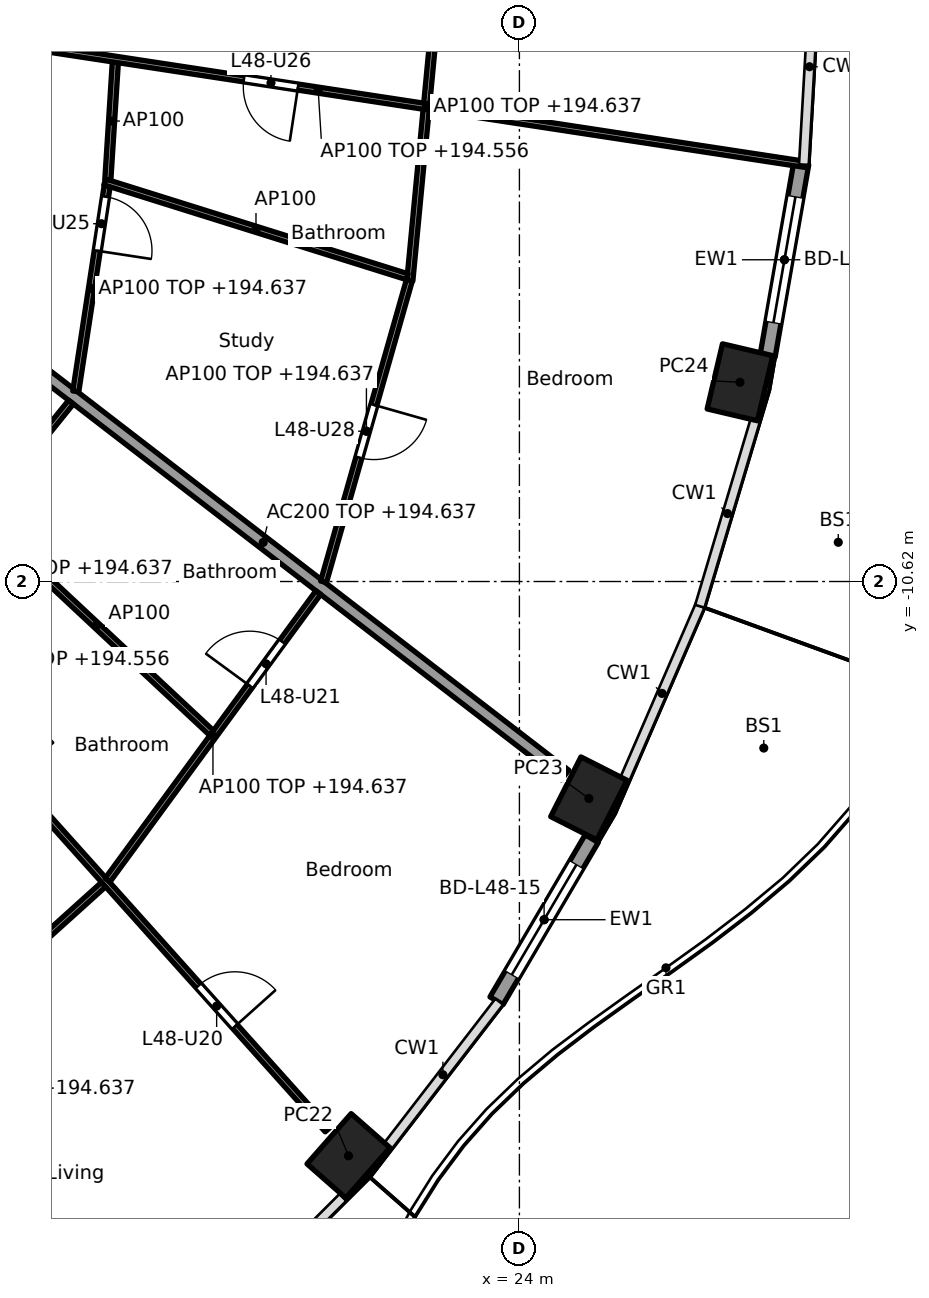
"""IFC4 building model, lengths in metres.
Left out: names, types, materials, properties, quantities, classifications, styles, units other than length and angle.
Written with IfcOpenShell. Run it as: python <this file> out.ifc"""

import sys

from ifc_helpers import new_model, si_unit, direction, frame, frame_2d, origin, origin_2d, place, context, subcontext, project, spatial, rectangle, hollow_rectangle, extrude, element, fill, save


model = new_model("IFC4")
c1 = context("Model", 3, precision=1e-05, world=origin(), true_north=direction((0.0, 1.0)))
c2 = subcontext(c1, "Body", "Model", "MODEL_VIEW")
j1 = project(units=[si_unit("LENGTHUNIT", "METRE"), si_unit("PLANEANGLEUNIT", "RADIAN")], contexts=[c1])
p1 = place(None, origin())
s1 = spatial("IfcSite", under=j1, at=p1, CompositionType="ELEMENT")
p2 = place(p1, origin())
s2 = spatial("IfcBuilding", under=s1, at=p2, CompositionType="ELEMENT")
p3 = place(p2, frame((0.0, 0.0, 191.8)))
s3 = spatial("IfcBuildingStorey", under=s2, at=p3, CompositionType="ELEMENT", Elevation=191.8)
for number, where, z_axis, x_axis in (
    (1, (21.189, -20.064, 0.0), (0.0, 0.0, 1.0), (0.66, 0.751, 0.0)),
    (2, (25.142, -14.188, 0.0), (0.0, 0.0, 1.0), (0.452, 0.892, 0.0)),
    (3, (27.627, -7.344, 0.0), (0.0, 0.0, 1.0), (0.229, 0.973, 0.0)),
):
    element("IfcColumn", number, at=place(p3, frame(where, z_axis=z_axis, x_axis=x_axis)), inside=s3, PredefinedType="COLUMN", context=c2, shape_type="SweptSolid", body=[
        extrude(hollow_rectangle(XDim=1.1, YDim=0.85, WallThickness=0.036, at=origin_2d()), origin(), (0.0, 0.0, 1.0), 3.7),
    ])
p4 = place(p3, frame((25.189, -14.848, 0.0), z_axis=(0.0, 0.0, 1.0), x_axis=(-0.506367803691, -0.862317602386, 0.0)))
e4 = element("IfcWall", 4, at=p4, inside=s3, PredefinedType="SOLIDWALL", context=c2, shape_type="SweptSolid", body=[
    extrude(rectangle(XDim=3.092, YDim=0.25, at=frame_2d((1.546, 0.0))), origin(), (0.0, 0.0, 1.0), 3.44),
])
p5 = place(p4, frame((0.496, 0.0, 0.0)))
e5 = element("IfcOpeningElement", 5, at=p5, cuts=e4, PredefinedType="OPENING", context=c2, shape_type="SweptSolid", body=[
    extrude(rectangle(XDim=2.1, YDim=2.4, at=frame_2d((1.05, 1.2))), frame((0.0, 0.135, 0.0), z_axis=(0.0, -1.0, 0.0), x_axis=(1.0, 0.0, 0.0)), (0.0, 0.0, 1.0), 0.27),
])
p6 = place(p3, frame((28.635, -3.747, 0.0), z_axis=(0.0, 0.0, 1.0), x_axis=(-0.172149769468, -0.985070787747, 0.0)))
e6 = element("IfcWall", 6, at=p6, inside=s3, PredefinedType="SOLIDWALL", context=c2, shape_type="SweptSolid", body=[
    extrude(rectangle(XDim=3.211, YDim=0.25, at=frame_2d((1.605, 0.0))), origin(), (0.0, 0.0, 1.0), 3.44),
])
p7 = place(p6, frame((0.555, 0.0, 0.0)))
e7 = element("IfcOpeningElement", 7, at=p7, cuts=e6, PredefinedType="OPENING", context=c2, shape_type="SweptSolid", body=[
    extrude(rectangle(XDim=2.1, YDim=2.4, at=frame_2d((1.05, 1.2))), frame((0.0, 0.135, 0.0), z_axis=(0.0, -1.0, 0.0), x_axis=(1.0, 0.0, 0.0)), (0.0, 0.0, 1.0), 0.27),
])
p8 = place(p3, frame((14.822, -6.154, 0.0), z_axis=(0.0, 0.0, 1.0), x_axis=(0.792203056092, -0.610257583254, 0.0)))
e8 = element("IfcWall", 8, at=p8, inside=s3, PredefinedType="PARTITIONING", context=c2, shape_type="SweptSolid", body=[
    extrude(rectangle(XDim=12.533, YDim=0.2, at=frame_2d((6.266, 0.0))), origin(), (0.0, 0.0, 1.0), 2.837),
])
p9 = place(p3, frame((22.744, 0.05, 0.0), z_axis=(0.0, 0.0, 1.0), x_axis=(-0.094931362305, -0.995483820286, 0.0)))
e9 = element("IfcWall", 9, at=p9, inside=s3, PredefinedType="PARTITIONING", context=c2, shape_type="SweptSolid", body=[
    extrude(rectangle(XDim=5.748, YDim=0.1, at=frame_2d((2.874, 0.0))), origin(), (0.0, 0.0, 1.0), 2.837),
])
p10 = place(p9, frame((1.012, 0.0, 0.0)))
e10 = element("IfcOpeningElement", 10, at=p10, cuts=e9, PredefinedType="OPENING", context=c2, shape_type="SweptSolid", body=[
    extrude(rectangle(XDim=0.9, YDim=2.1, at=frame_2d((0.45, 1.05))), frame((0.0, 0.06, 0.0), z_axis=(0.0, -1.0, 0.0), x_axis=(1.0, 0.0, 0.0)), (0.0, 0.0, 1.0), 0.12),
])
p11 = place(p3, frame((13.045, -19.313, 0.0), z_axis=(0.0, 0.0, 1.0), x_axis=(0.742790086539, 0.66952437397, 0.0)))
e11 = element("IfcWall", 11, at=p11, inside=s3, PredefinedType="PARTITIONING", context=c2, shape_type="SweptSolid", body=[
    extrude(rectangle(XDim=5.542, YDim=0.1, at=frame_2d((2.771, 0.0))), origin(), (0.0, 0.0, 1.0), 2.837),
])
p12 = place(p11, frame((2.321, 0.0, 0.0)))
e12 = element("IfcOpeningElement", 12, at=p12, cuts=e11, PredefinedType="OPENING", context=c2, shape_type="SweptSolid", body=[
    extrude(rectangle(XDim=0.9, YDim=2.1, at=frame_2d((0.45, 1.05))), frame((0.0, 0.06, 0.0), z_axis=(0.0, -1.0, 0.0), x_axis=(1.0, 0.0, 0.0)), (0.0, 0.0, 1.0), 0.12),
])
p13 = place(p3, frame((10.178, -7.732, 0.0), z_axis=(0.0, 0.0, 1.0), x_axis=(0.667283629999, -0.74480370376, 0.0)))
e13 = element("IfcWall", 13, at=p13, inside=s3, PredefinedType="PARTITIONING", context=c2, shape_type="SweptSolid", body=[
    extrude(rectangle(XDim=15.983, YDim=0.1, at=frame_2d((7.992, 0.0))), origin(), (0.0, 0.0, 1.0), 2.756),
])
p14 = place(p13, frame((2.07, 0.0, 0.0)))
e14 = element("IfcOpeningElement", 14, at=p14, cuts=e13, PredefinedType="OPENING", context=c2, shape_type="SweptSolid", body=[
    extrude(rectangle(XDim=0.9, YDim=2.1, at=frame_2d((0.45, 1.05))), frame((0.0, 0.06, 0.0), z_axis=(0.0, -1.0, 0.0), x_axis=(1.0, 0.0, 0.0)), (0.0, 0.0, 1.0), 0.12),
])
p15 = place(p13, frame((7.331, 0.0, 0.0)))
e15 = element("IfcOpeningElement", 15, at=p15, cuts=e13, PredefinedType="OPENING", context=c2, shape_type="SweptSolid", body=[
    extrude(rectangle(XDim=0.9, YDim=2.1, at=frame_2d((0.45, 1.05))), frame((0.0, 0.06, 0.0), z_axis=(0.0, -1.0, 0.0), x_axis=(1.0, 0.0, 0.0)), (0.0, 0.0, 1.0), 0.12),
])
p16 = place(p13, frame((12.802, 0.0, 0.0)))
e16 = element("IfcOpeningElement", 16, at=p16, cuts=e13, PredefinedType="OPENING", context=c2, shape_type="SweptSolid", body=[
    extrude(rectangle(XDim=0.9, YDim=2.1, at=frame_2d((0.45, 1.05))), frame((0.0, 0.06, 0.0), z_axis=(0.0, -1.0, 0.0), x_axis=(1.0, 0.0, 0.0)), (0.0, 0.0, 1.0), 0.12),
])
p17 = place(p3, frame((13.572, -11.447, 0.0), z_axis=(0.0, 0.0, 1.0), x_axis=(0.628738316533, 0.777616955399, 0.0)))
e17 = element("IfcWall", 17, at=p17, inside=s3, PredefinedType="PARTITIONING", context=c2, shape_type="SweptSolid", body=[
    extrude(rectangle(XDim=4.857, YDim=0.1, at=frame_2d((2.429, 0.0))), origin(), (0.0, 0.0, 1.0), 2.837),
])
p18 = place(p3, frame((17.229, -15.529, 0.0), z_axis=(0.0, 0.0, 1.0), x_axis=(0.591110768293, 0.806590391468, 0.0)))
e18 = element("IfcWall", 18, at=p18, inside=s3, PredefinedType="PARTITIONING", context=c2, shape_type="SweptSolid", body=[
    extrude(rectangle(XDim=5.86, YDim=0.1, at=frame_2d((2.93, 0.0))), origin(), (0.0, 0.0, 1.0), 2.837),
])
p19 = place(p18, frame((3.958, 0.0, 0.0)))
e19 = element("IfcOpeningElement", 19, at=p19, cuts=e18, PredefinedType="OPENING", context=c2, shape_type="SweptSolid", body=[
    extrude(rectangle(XDim=0.9, YDim=2.1, at=frame_2d((0.45, 1.05))), frame((0.0, 0.06, 0.0), z_axis=(0.0, -1.0, 0.0), x_axis=(1.0, 0.0, 0.0)), (0.0, 0.0, 1.0), 0.12),
])
p20 = place(p3, frame((15.152, -9.573, 0.0), z_axis=(0.0, 0.0, 1.0), x_axis=(0.730723083214, -0.682673989294, 0.0)))
e20 = element("IfcWall", 20, at=p20, inside=s3, PredefinedType="PARTITIONING", context=c2, shape_type="SweptSolid", body=[
    extrude(rectangle(XDim=5.183, YDim=0.1, at=frame_2d((2.591, 0.0))), origin(), (0.0, 0.0, 1.0), 3.44),
])
p21 = place(p3, frame((16.704, -7.493, 0.0), z_axis=(0.0, 0.0, 1.0), x_axis=(0.1510806336, 0.988521442434, 0.0)))
e21 = element("IfcWall", 21, at=p21, inside=s3, PredefinedType="PARTITIONING", context=c2, shape_type="SweptSolid", body=[
    extrude(rectangle(XDim=3.419, YDim=0.1, at=frame_2d((1.71, 0.0))), origin(), (0.0, 0.0, 1.0), 2.837),
])
p22 = place(p21, frame((2.339, 0.0, 0.0)))
e22 = element("IfcOpeningElement", 22, at=p22, cuts=e21, PredefinedType="OPENING", context=c2, shape_type="SweptSolid", body=[
    extrude(rectangle(XDim=0.9, YDim=2.1, at=frame_2d((0.45, 1.05))), frame((0.0, 0.06, 0.0), z_axis=(0.0, -1.0, 0.0), x_axis=(1.0, 0.0, 0.0)), (0.0, 0.0, 1.0), 0.12),
])
p23 = place(p3, frame((20.779, -10.625, 0.0), z_axis=(0.0, 0.0, 1.0), x_axis=(0.273819702124, 0.961781040949, 0.0)))
e23 = element("IfcWall", 23, at=p23, inside=s3, PredefinedType="PARTITIONING", context=c2, shape_type="SweptSolid", body=[
    extrude(rectangle(XDim=5.152, YDim=0.1, at=frame_2d((2.576, 0.0))), origin(), (0.0, 0.0, 1.0), 2.837),
])
p24 = place(p23, frame((2.126, 0.0, 0.0)))
e24 = element("IfcOpeningElement", 24, at=p24, cuts=e23, PredefinedType="OPENING", context=c2, shape_type="SweptSolid", body=[
    extrude(rectangle(XDim=0.9, YDim=2.1, at=frame_2d((0.45, 1.05))), frame((0.0, 0.06, 0.0), z_axis=(0.0, -1.0, 0.0), x_axis=(1.0, 0.0, 0.0)), (0.0, 0.0, 1.0), 0.12),
])
p25 = place(p3, frame((17.181, -4.049, 0.0), z_axis=(0.0, 0.0, 1.0), x_axis=(0.954246359918, -0.299021545351, 0.0)))
e25 = element("IfcWall", 25, at=p25, inside=s3, PredefinedType="PARTITIONING", context=c2, shape_type="SweptSolid", body=[
    extrude(rectangle(XDim=5.213, YDim=0.1, at=frame_2d((2.606, 0.0))), origin(), (0.0, 0.0, 1.0), 3.44),
])
p26 = place(p3, frame((17.232, -4.014, 0.0), z_axis=(0.0, 0.0, 1.0), x_axis=(0.063689464349, 0.997969765139, 0.0)))
e26 = element("IfcWall", 26, at=p26, inside=s3, PredefinedType="PARTITIONING", context=c2, shape_type="SweptSolid", body=[
    extrude(rectangle(XDim=1.936, YDim=0.1, at=frame_2d((0.968, 0.0))), origin(), (0.0, 0.0, 1.0), 3.44),
])
p27 = place(p3, frame((12.664, -1.316, 0.0), z_axis=(0.0, 0.0, 1.0), x_axis=(0.988585177081, -0.150663026836, 0.0)))
e27 = element("IfcWall", 27, at=p27, inside=s3, PredefinedType="PARTITIONING", context=c2, shape_type="SweptSolid", body=[
    extrude(rectangle(XDim=16.24, YDim=0.1, at=frame_2d((8.12, 0.0))), origin(), (0.0, 0.0, 1.0), 2.756),
])
p28 = place(p27, frame((1.924, 0.0, 0.0)))
e28 = element("IfcOpeningElement", 28, at=p28, cuts=e27, PredefinedType="OPENING", context=c2, shape_type="SweptSolid", body=[
    extrude(rectangle(XDim=0.9, YDim=2.1, at=frame_2d((0.45, 1.05))), frame((0.0, 0.06, 0.0), z_axis=(0.0, -1.0, 0.0), x_axis=(1.0, 0.0, 0.0)), (0.0, 0.0, 1.0), 0.12),
])
p29 = place(p27, frame((6.885, 0.0, 0.0)))
e29 = element("IfcOpeningElement", 29, at=p29, cuts=e27, PredefinedType="OPENING", context=c2, shape_type="SweptSolid", body=[
    extrude(rectangle(XDim=0.9, YDim=2.1, at=frame_2d((0.45, 1.05))), frame((0.0, 0.06, 0.0), z_axis=(0.0, -1.0, 0.0), x_axis=(1.0, 0.0, 0.0)), (0.0, 0.0, 1.0), 0.12),
])
p30 = place(p5, origin())
e30 = element("IfcDoor", 30, at=p30, inside=s3, OperationType="SLIDING_TO_LEFT", PredefinedType="DOOR", context=c2, shape_type="SweptSolid", body=[
    extrude(rectangle(XDim=2.1, YDim=2.4, at=frame_2d((1.05, 1.2))), frame((0.0, 0.025, 0.0), z_axis=(0.0, -1.0, 0.0), x_axis=(1.0, 0.0, 0.0)), (0.0, 0.0, 1.0), 0.05),
])
fill(e5, e30)
p31 = place(p7, origin())
e31 = element("IfcDoor", 31, at=p31, inside=s3, OperationType="SLIDING_TO_LEFT", PredefinedType="DOOR", context=c2, shape_type="SweptSolid", body=[
    extrude(rectangle(XDim=2.1, YDim=2.4, at=frame_2d((1.05, 1.2))), frame((0.0, 0.025, 0.0), z_axis=(0.0, -1.0, 0.0), x_axis=(1.0, 0.0, 0.0)), (0.0, 0.0, 1.0), 0.05),
])
fill(e7, e31)
p32 = place(p16, origin())
e32 = element("IfcDoor", 32, at=p32, inside=s3, OperationType="SINGLE_SWING_RIGHT", PredefinedType="DOOR", context=c2, shape_type="SweptSolid", body=[
    extrude(rectangle(XDim=0.9, YDim=2.1, at=frame_2d((0.45, 1.05))), frame((0.0, 0.025, 0.0), z_axis=(0.0, -1.0, 0.0), x_axis=(1.0, 0.0, 0.0)), (0.0, 0.0, 1.0), 0.05),
])
fill(e16, e32)
p33 = place(p19, origin())
e33 = element("IfcDoor", 33, at=p33, inside=s3, OperationType="SINGLE_SWING_LEFT", PredefinedType="DOOR", context=c2, shape_type="SweptSolid", body=[
    extrude(rectangle(XDim=0.9, YDim=2.1, at=frame_2d((0.45, 1.05))), frame((0.0, 0.025, 0.0), z_axis=(0.0, -1.0, 0.0), x_axis=(1.0, 0.0, 0.0)), (0.0, 0.0, 1.0), 0.05),
])
fill(e19, e33)
p34 = place(p22, frame((0.9, 0.0, 0.0), x_axis=(-1.0, 0.0, 0.0)))
e34 = element("IfcDoor", 34, at=p34, inside=s3, OperationType="SINGLE_SWING_RIGHT", PredefinedType="DOOR", context=c2, shape_type="SweptSolid", body=[
    extrude(rectangle(XDim=0.9, YDim=2.1, at=frame_2d((0.45, 1.05))), frame((0.0, 0.025, 0.0), z_axis=(0.0, -1.0, 0.0), x_axis=(1.0, 0.0, 0.0)), (0.0, 0.0, 1.0), 0.05),
])
fill(e22, e34)
p35 = place(p29, frame((0.9, 0.0, 0.0), x_axis=(-1.0, 0.0, 0.0)))
e35 = element("IfcDoor", 35, at=p35, inside=s3, OperationType="SINGLE_SWING_LEFT", PredefinedType="DOOR", context=c2, shape_type="SweptSolid", body=[
    extrude(rectangle(XDim=0.9, YDim=2.1, at=frame_2d((0.45, 1.05))), frame((0.0, 0.025, 0.0), z_axis=(0.0, -1.0, 0.0), x_axis=(1.0, 0.0, 0.0)), (0.0, 0.0, 1.0), 0.05),
])
fill(e29, e35)
p36 = place(p24, frame((0.9, 0.0, 0.0), x_axis=(-1.0, 0.0, 0.0)))
e36 = element("IfcDoor", 36, at=p36, inside=s3, OperationType="SINGLE_SWING_LEFT", PredefinedType="DOOR", context=c2, shape_type="SweptSolid", body=[
    extrude(rectangle(XDim=0.9, YDim=2.1, at=frame_2d((0.45, 1.05))), frame((0.0, 0.025, 0.0), z_axis=(0.0, -1.0, 0.0), x_axis=(1.0, 0.0, 0.0)), (0.0, 0.0, 1.0), 0.05),
])
fill(e24, e36)
save(model, sys.argv[1])
